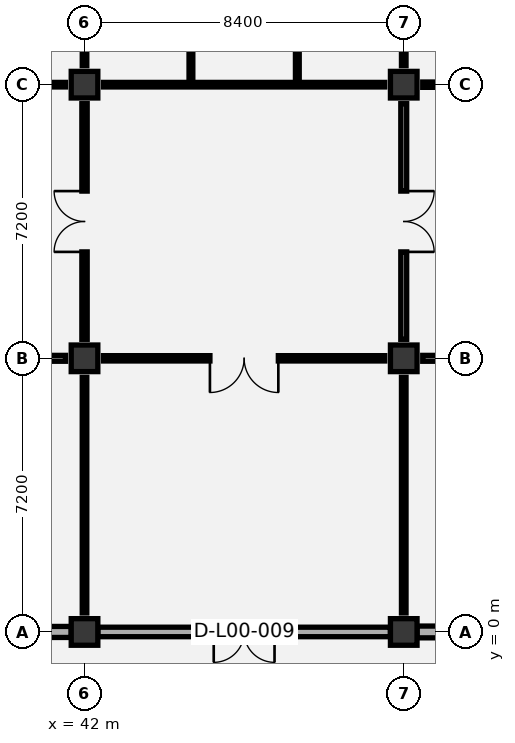
"""IFC4 building model, lengths in metres.
Left out: names, types, materials, properties, quantities, classifications, styles, units other than length and angle.
Written with IfcOpenShell. Run it as: python <this file> out.ifc"""

import sys

from ifc_helpers import new_model, si_unit, direction, frame, frame_2d, origin, origin_2d, place, context, subcontext, project, spatial, rectangle, extrude, element, fill, save


model = new_model("IFC4")
c1 = context("Model", 3, precision=1e-05, world=origin(), true_north=direction((0.0, 1.0)))
c2 = subcontext(c1, "Body", "Model", "MODEL_VIEW")
j1 = project(units=[si_unit("LENGTHUNIT", "METRE"), si_unit("PLANEANGLEUNIT", "RADIAN")], contexts=[c1])
p1 = place(None, origin())
s1 = spatial("IfcSite", under=j1, at=p1, CompositionType="ELEMENT")
p2 = place(p1, origin())
s2 = spatial("IfcBuilding", under=s1, at=p2, CompositionType="ELEMENT")
p3 = place(p2, origin())
s3 = spatial("IfcBuildingStorey", under=s2, at=p3, CompositionType="ELEMENT", Elevation=0.0)
for number, where, z_axis, x_axis in (
    (1, (42.0, 0.0, 0.0), (0.0, 0.0, 1.0), (1.0, 0.0, 0.0)),
    (2, (42.0, 7.2, 0.0), (0.0, 0.0, 1.0), (1.0, 0.0, 0.0)),
    (3, (42.0, 14.4, 0.0), (0.0, 0.0, 1.0), (1.0, 0.0, 0.0)),
    (4, (50.4, 0.0, 0.0), (0.0, 0.0, 1.0), (1.0, 0.0, 0.0)),
    (5, (50.4, 7.2, 0.0), (0.0, 0.0, 1.0), (1.0, 0.0, 0.0)),
    (6, (50.4, 14.4, 0.0), (0.0, 0.0, 1.0), (1.0, 0.0, 0.0)),
):
    element("IfcColumn", number, at=place(p3, frame(where, z_axis=z_axis, x_axis=x_axis)), inside=s3, PredefinedType="COLUMN", context=c2, shape_type="SweptSolid", body=[
        extrude(rectangle(XDim=0.7, YDim=0.7, at=origin_2d()), origin(), (0.0, 0.0, 1.0), 6.0),
    ])
p4 = place(p3, frame((33.95, 0.0, 0.0), z_axis=(0.0, 0.0, 1.0), x_axis=(1.0, 0.0, 0.0)))
e7 = element("IfcWall", 7, at=p4, inside=s3, PredefinedType="SOLIDWALL", context=c2, shape_type="SweptSolid", body=[
    extrude(rectangle(XDim=7.7, YDim=0.29, at=frame_2d((3.85, 0.0))), origin(), (0.0, 0.0, 1.0), 5.02),
])
p5 = place(p4, frame((2.95, 0.0, 0.0)))
e8 = element("IfcOpeningElement", 8, at=p5, cuts=e7, PredefinedType="OPENING", context=c2, shape_type="SweptSolid", body=[
    extrude(rectangle(XDim=1.8, YDim=2.35, at=frame_2d((0.9, 1.175))), frame((0.0, 0.155, 0.0), z_axis=(0.0, -1.0, 0.0), x_axis=(1.0, 0.0, 0.0)), (0.0, 0.0, 1.0), 0.31),
])
p6 = place(p3, frame((42.35, 0.0, 0.0), z_axis=(0.0, 0.0, 1.0), x_axis=(1.0, 0.0, 0.0)))
e9 = element("IfcWall", 9, at=p6, inside=s3, PredefinedType="SOLIDWALL", context=c2, shape_type="SweptSolid", body=[
    extrude(rectangle(XDim=7.7, YDim=0.25, at=frame_2d((3.85, 0.0))), origin(), (0.0, 0.0, 1.0), 5.02),
])
p7 = place(p6, frame((3.05, 0.0, 0.0)))
e10 = element("IfcOpeningElement", 10, at=p7, cuts=e9, PredefinedType="OPENING", context=c2, shape_type="SweptSolid", body=[
    extrude(rectangle(XDim=1.6, YDim=2.25, at=frame_2d((0.8, 1.125))), frame((0.0, 0.135, 0.0), z_axis=(0.0, -1.0, 0.0), x_axis=(1.0, 0.0, 0.0)), (0.0, 0.0, 1.0), 0.27),
])
p8 = place(p3, frame((50.75, 0.0, 0.0), z_axis=(0.0, 0.0, 1.0), x_axis=(1.0, 0.0, 0.0)))
e11 = element("IfcWall", 11, at=p8, inside=s3, PredefinedType="SOLIDWALL", context=c2, shape_type="SweptSolid", body=[
    extrude(rectangle(XDim=7.675, YDim=0.31, at=frame_2d((3.837, 0.0))), origin(), (0.0, 0.0, 1.0), 5.02),
])
p9 = place(p8, frame((2.738, 0.0, 0.0)))
e12 = element("IfcOpeningElement", 12, at=p9, cuts=e11, PredefinedType="OPENING", context=c2, shape_type="SweptSolid", body=[
    extrude(rectangle(XDim=2.2, YDim=2.45, at=frame_2d((1.1, 1.225))), frame((0.0, 0.165, 0.0), z_axis=(0.0, -1.0, 0.0), x_axis=(1.0, 0.0, 0.0)), (0.0, 0.0, 1.0), 0.33),
])
for number, where, z_axis, x_axis in (
    (13, (44.8, 14.55, 0.0), (0.0, 0.0, 1.0), (0.0, 1.0, 0.0)),
    (14, (47.6, 14.55, 0.0), (0.0, 0.0, 1.0), (0.0, 1.0, 0.0)),
):
    element("IfcWall", number, at=place(p3, frame(where, z_axis=z_axis, x_axis=x_axis)), inside=s3, PredefinedType="PARTITIONING", context=c2, shape_type="SweptSolid", body=[
        extrude(rectangle(XDim=4.59, YDim=0.1, at=frame_2d((2.295, 0.0))), origin(), (0.0, 0.0, 1.0), 5.675),
    ])
p10 = place(p3, frame((42.0, 0.5, 0.0), z_axis=(0.0, 0.0, 1.0), x_axis=(0.0, 1.0, 0.0)))
e15 = element("IfcWall", 15, at=p10, inside=s3, PredefinedType="PARTITIONING", context=c2, shape_type="SweptSolid", body=[
    extrude(rectangle(XDim=6.2, YDim=0.12, at=frame_2d((3.1, 0.0))), origin(), (0.0, 0.0, 1.0), 4.92),
])
p11 = place(p3, frame((34.1, 7.2, 0.0), z_axis=(0.0, 0.0, 1.0), x_axis=(1.0, 0.0, 0.0)))
e16 = element("IfcWall", 16, at=p11, inside=s3, PredefinedType="PARTITIONING", context=c2, shape_type="SweptSolid", body=[
    extrude(rectangle(XDim=7.4, YDim=0.155, at=frame_2d((3.7, 0.0))), origin(), (0.0, 0.0, 1.0), 4.87),
])
p12 = place(p11, frame((2.8, 0.0, 0.0)))
e17 = element("IfcOpeningElement", 17, at=p12, cuts=e16, PredefinedType="OPENING", context=c2, shape_type="SweptSolid", body=[
    extrude(rectangle(XDim=1.8, YDim=2.25, at=frame_2d((0.9, 1.125))), frame((0.0, 0.087, 0.0), z_axis=(0.0, -1.0, 0.0), x_axis=(1.0, 0.0, 0.0)), (0.0, 0.0, 1.0), 0.175),
])
p13 = place(p3, frame((42.0, 7.7, 0.0), z_axis=(0.0, 0.0, 1.0), x_axis=(0.0, 1.0, 0.0)))
e18 = element("IfcWall", 18, at=p13, inside=s3, PredefinedType="PARTITIONING", context=c2, shape_type="SweptSolid", body=[
    extrude(rectangle(XDim=6.2, YDim=0.14, at=frame_2d((3.1, 0.0))), origin(), (0.0, 0.0, 1.0), 5.27),
])
p14 = place(p13, frame((2.3, 0.0, 0.0)))
e19 = element("IfcOpeningElement", 19, at=p14, cuts=e18, PredefinedType="OPENING", context=c2, shape_type="SweptSolid", body=[
    extrude(rectangle(XDim=1.6, YDim=2.2, at=frame_2d((0.8, 1.1))), frame((0.0, 0.08, 0.0), z_axis=(0.0, -1.0, 0.0), x_axis=(1.0, 0.0, 0.0)), (0.0, 0.0, 1.0), 0.16),
])
p15 = place(p3, frame((34.1, 14.4, 0.0), z_axis=(0.0, 0.0, 1.0), x_axis=(1.0, 0.0, 0.0)))
e20 = element("IfcWall", 20, at=p15, inside=s3, PredefinedType="PARTITIONING", context=c2, shape_type="SweptSolid", body=[
    extrude(rectangle(XDim=7.4, YDim=0.12, at=frame_2d((3.7, 0.0))), origin(), (0.0, 0.0, 1.0), 5.02),
])
p16 = place(p3, frame((42.0, 14.9, 0.0), z_axis=(0.0, 0.0, 1.0), x_axis=(0.0, 1.0, 0.0)))
e21 = element("IfcWall", 21, at=p16, inside=s3, PredefinedType="PARTITIONING", context=c2, shape_type="SweptSolid", body=[
    extrude(rectangle(XDim=6.2, YDim=0.12, at=frame_2d((3.1, 0.0))), origin(), (0.0, 0.0, 1.0), 5.02),
])
p17 = place(p3, frame((50.4, 0.5, 0.0), z_axis=(0.0, 0.0, 1.0), x_axis=(0.0, 1.0, 0.0)))
e22 = element("IfcWall", 22, at=p17, inside=s3, PredefinedType="PARTITIONING", context=c2, shape_type="SweptSolid", body=[
    extrude(rectangle(XDim=6.2, YDim=0.12, at=frame_2d((3.1, 0.0))), origin(), (0.0, 0.0, 1.0), 5.27),
])
p18 = place(p3, frame((42.5, 7.2, 0.0), z_axis=(0.0, 0.0, 1.0), x_axis=(1.0, 0.0, 0.0)))
e23 = element("IfcWall", 23, at=p18, inside=s3, PredefinedType="PARTITIONING", context=c2, shape_type="SweptSolid", body=[
    extrude(rectangle(XDim=7.4, YDim=0.14, at=frame_2d((3.7, 0.0))), origin(), (0.0, 0.0, 1.0), 4.87),
])
p19 = place(p18, frame((2.8, 0.0, 0.0)))
e24 = element("IfcOpeningElement", 24, at=p19, cuts=e23, PredefinedType="OPENING", context=c2, shape_type="SweptSolid", body=[
    extrude(rectangle(XDim=1.8, YDim=2.25, at=frame_2d((0.9, 1.125))), frame((0.0, 0.08, 0.0), z_axis=(0.0, -1.0, 0.0), x_axis=(1.0, 0.0, 0.0)), (0.0, 0.0, 1.0), 0.16),
])
p20 = place(p3, frame((50.4, 7.7, 0.0), z_axis=(0.0, 0.0, 1.0), x_axis=(0.0, 1.0, 0.0)))
e25 = element("IfcWall", 25, at=p20, inside=s3, PredefinedType="PARTITIONING", context=c2, shape_type="SweptSolid", body=[
    extrude(rectangle(XDim=6.2, YDim=0.155, at=frame_2d((3.1, 0.0))), origin(), (0.0, 0.0, 1.0), 4.92),
])
p21 = place(p20, frame((2.3, 0.0, 0.0)))
e26 = element("IfcOpeningElement", 26, at=p21, cuts=e25, PredefinedType="OPENING", context=c2, shape_type="SweptSolid", body=[
    extrude(rectangle(XDim=1.6, YDim=2.2, at=frame_2d((0.8, 1.1))), frame((0.0, 0.087, 0.0), z_axis=(0.0, -1.0, 0.0), x_axis=(1.0, 0.0, 0.0)), (0.0, 0.0, 1.0), 0.175),
])
p22 = place(p3, frame((42.5, 14.4, 0.0), z_axis=(0.0, 0.0, 1.0), x_axis=(1.0, 0.0, 0.0)))
e27 = element("IfcWall", 27, at=p22, inside=s3, PredefinedType="PARTITIONING", context=c2, shape_type="SweptSolid", body=[
    extrude(rectangle(XDim=7.4, YDim=0.12, at=frame_2d((3.7, 0.0))), origin(), (0.0, 0.0, 1.0), 4.87),
])
p23 = place(p3, frame((50.4, 14.9, 0.0), z_axis=(0.0, 0.0, 1.0), x_axis=(0.0, 1.0, 0.0)))
e28 = element("IfcWall", 28, at=p23, inside=s3, PredefinedType="PARTITIONING", context=c2, shape_type="SweptSolid", body=[
    extrude(rectangle(XDim=6.2, YDim=0.12, at=frame_2d((3.1, 0.0))), origin(), (0.0, 0.0, 1.0), 5.38),
])
p24 = place(p3, frame((50.9, 7.2, 0.0), z_axis=(0.0, 0.0, 1.0), x_axis=(1.0, 0.0, 0.0)))
e29 = element("IfcWall", 29, at=p24, inside=s3, PredefinedType="PARTITIONING", context=c2, shape_type="SweptSolid", body=[
    extrude(rectangle(XDim=7.4, YDim=0.155, at=frame_2d((3.7, 0.0))), origin(), (0.0, 0.0, 1.0), 4.87),
])
p25 = place(p24, frame((2.8, 0.0, 0.0)))
e30 = element("IfcOpeningElement", 30, at=p25, cuts=e29, PredefinedType="OPENING", context=c2, shape_type="SweptSolid", body=[
    extrude(rectangle(XDim=1.8, YDim=2.25, at=frame_2d((0.9, 1.125))), frame((0.0, 0.087, 0.0), z_axis=(0.0, -1.0, 0.0), x_axis=(1.0, 0.0, 0.0)), (0.0, 0.0, 1.0), 0.175),
])
p26 = place(p3, frame((50.9, 14.4, 0.0), z_axis=(0.0, 0.0, 1.0), x_axis=(1.0, 0.0, 0.0)))
e31 = element("IfcWall", 31, at=p26, inside=s3, PredefinedType="PARTITIONING", context=c2, shape_type="SweptSolid", body=[
    extrude(rectangle(XDim=7.4, YDim=0.14, at=frame_2d((3.7, 0.0))), origin(), (0.0, 0.0, 1.0), 4.87),
])
p27 = place(p26, frame((2.9, 0.0, 0.0)))
e32 = element("IfcOpeningElement", 32, at=p27, cuts=e31, PredefinedType="OPENING", context=c2, shape_type="SweptSolid", body=[
    extrude(rectangle(XDim=1.6, YDim=2.2, at=frame_2d((0.8, 1.1))), frame((0.0, 0.08, 0.0), z_axis=(0.0, -1.0, 0.0), x_axis=(1.0, 0.0, 0.0)), (0.0, 0.0, 1.0), 0.16),
])
p28 = place(p7, frame((1.6, 0.0, 0.0), z_axis=(0.0, 0.0, 1.0), x_axis=(-1.0, 0.0, 0.0)))
e33 = element("IfcDoor", 33, at=p28, inside=s3, OperationType="DOUBLE_DOOR_SINGLE_SWING", PredefinedType="DOOR", context=c2, shape_type="SweptSolid", body=[
    extrude(rectangle(XDim=1.6, YDim=2.25, at=frame_2d((0.8, 1.125))), frame((0.0, 0.025, 0.0), z_axis=(0.0, -1.0, 0.0), x_axis=(1.0, 0.0, 0.0)), (0.0, 0.0, 1.0), 0.05),
])
fill(e10, e33)
p29 = place(p14, origin())
e34 = element("IfcDoor", 34, at=p29, inside=s3, OperationType="DOUBLE_DOOR_SINGLE_SWING", PredefinedType="DOOR", context=c2, shape_type="SweptSolid", body=[
    extrude(rectangle(XDim=1.6, YDim=2.2, at=frame_2d((0.8, 1.1))), frame((0.0, 0.025, 0.0), z_axis=(0.0, -1.0, 0.0), x_axis=(1.0, 0.0, 0.0)), (0.0, 0.0, 1.0), 0.05),
])
fill(e19, e34)
p30 = place(p19, frame((1.8, 0.0, 0.0), z_axis=(0.0, 0.0, 1.0), x_axis=(-1.0, 0.0, 0.0)))
e35 = element("IfcDoor", 35, at=p30, inside=s3, OperationType="DOUBLE_DOOR_SINGLE_SWING", PredefinedType="DOOR", context=c2, shape_type="SweptSolid", body=[
    extrude(rectangle(XDim=1.8, YDim=2.25, at=frame_2d((0.9, 1.125))), frame((0.0, 0.025, 0.0), z_axis=(0.0, -1.0, 0.0), x_axis=(1.0, 0.0, 0.0)), (0.0, 0.0, 1.0), 0.05),
])
fill(e24, e35)
p31 = place(p21, frame((1.6, 0.0, 0.0), z_axis=(0.0, 0.0, 1.0), x_axis=(-1.0, 0.0, 0.0)))
e36 = element("IfcDoor", 36, at=p31, inside=s3, OperationType="DOUBLE_DOOR_SINGLE_SWING", PredefinedType="DOOR", context=c2, shape_type="SweptSolid", body=[
    extrude(rectangle(XDim=1.6, YDim=2.2, at=frame_2d((0.8, 1.1))), frame((0.0, 0.025, 0.0), z_axis=(0.0, -1.0, 0.0), x_axis=(1.0, 0.0, 0.0)), (0.0, 0.0, 1.0), 0.05),
])
fill(e26, e36)
save(model, sys.argv[1])
